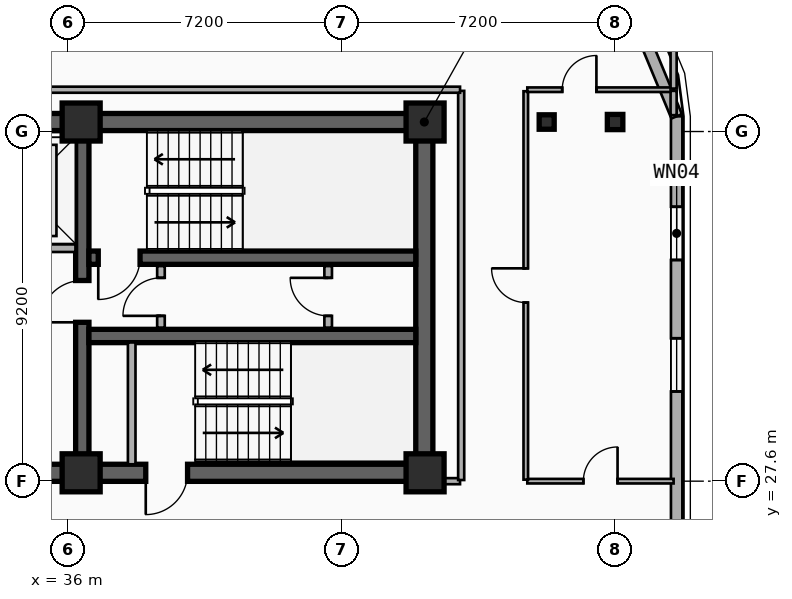
"""IFC4 building model, lengths in metres.
Left out: names, types, materials, properties, quantities, classifications, styles, units other than length and angle.
Written with IfcOpenShell. Run it as: python <this file> out.ifc"""

import sys

from ifc_helpers import new_model, si_unit, direction, frame, frame_2d, origin, origin_2d, place, context, subcontext, project, spatial, rectangle, i_section, extrude, element, fill, save


model = new_model("IFC4")
c1 = context("Model", 3, precision=1e-05, world=origin(), true_north=direction((0.0, 1.0)))
c2 = subcontext(c1, "Body", "Model", "MODEL_VIEW")
j1 = project(units=[si_unit("LENGTHUNIT", "METRE"), si_unit("PLANEANGLEUNIT", "RADIAN")], contexts=[c1])
p1 = place(None, origin())
s1 = spatial("IfcSite", under=j1, at=p1, CompositionType="ELEMENT")
p2 = place(p1, origin())
s2 = spatial("IfcBuilding", under=s1, at=p2, CompositionType="ELEMENT")
p3 = place(p2, frame((0.0, 0.0, 232.8)))
s3 = spatial("IfcBuildingStorey", under=s2, at=p3, CompositionType="ELEMENT", Elevation=232.8)
p4 = place(p3, frame((12.15, 37.05, 0.0), z_axis=(0.0, 0.0, 1.0), x_axis=(1.0, 0.0, 0.0)))
e1 = element("IfcWall", 1, at=p4, inside=s3, PredefinedType="SHEAR", context=c2, shape_type="SweptSolid", body=[
    extrude(rectangle(XDim=33.23, YDim=0.45, at=frame_2d((16.615, 0.0))), origin(), (0.0, 0.0, 1.0), 3.6),
])
p5 = place(p3, frame((45.38, 27.82, 0.0), z_axis=(0.0, 0.0, 1.0), x_axis=(-1.0, 0.0, 0.0)))
e2 = element("IfcWall", 2, at=p5, inside=s3, PredefinedType="SHEAR", context=c2, shape_type="SweptSolid", body=[
    extrude(rectangle(XDim=12.23, YDim=0.45, at=frame_2d((6.115, 0.0))), origin(), (0.0, 0.0, 1.0), 3.6),
])
p6 = place(p5, frame((9.93, 0.0, 0.0)))
e3 = element("IfcOpeningElement", 3, at=p6, cuts=e2, PredefinedType="OPENING", context=c2, shape_type="SweptSolid", body=[
    extrude(rectangle(XDim=1.1, YDim=2.15, at=frame_2d((0.55, 1.075))), frame((0.0, 0.235, 0.0), z_axis=(0.0, -1.0, 0.0), x_axis=(1.0, 0.0, 0.0)), (0.0, 0.0, 1.0), 0.47),
])
p7 = place(p5, frame((6.23, 0.0, 0.0)))
e4 = element("IfcOpeningElement", 4, at=p7, cuts=e2, PredefinedType="OPENING", context=c2, shape_type="SweptSolid", body=[
    extrude(rectangle(XDim=1.1, YDim=2.15, at=frame_2d((0.55, 1.075))), frame((0.0, 0.235, 0.0), z_axis=(0.0, -1.0, 0.0), x_axis=(1.0, 0.0, 0.0)), (0.0, 0.0, 1.0), 0.47),
])
p8 = place(p3, frame((45.38, 28.045, 0.0), z_axis=(0.0, 0.0, 1.0), x_axis=(0.0, 1.0, 0.0)))
e5 = element("IfcWall", 5, at=p8, inside=s3, PredefinedType="SHEAR", context=c2, shape_type="SweptSolid", body=[
    extrude(rectangle(XDim=8.78, YDim=0.45, at=frame_2d((4.39, 0.0))), origin(), (0.0, 0.0, 1.0), 3.6),
])
p9 = place(p3, frame((36.38, 28.045, 0.0), z_axis=(0.0, 0.0, 1.0), x_axis=(0.0, 1.0, 0.0)))
e6 = element("IfcWall", 6, at=p9, inside=s3, PredefinedType="SHEAR", context=c2, shape_type="SweptSolid", body=[
    extrude(rectangle(XDim=8.78, YDim=0.35, at=frame_2d((4.39, 0.0))), origin(), (0.0, 0.0, 1.0), 3.6),
])
p10 = place(p9, frame((3.735, 0.0, 0.0)))
e7 = element("IfcOpeningElement", 7, at=p10, cuts=e6, PredefinedType="OPENING", context=c2, shape_type="SweptSolid", body=[
    extrude(rectangle(XDim=1.1, YDim=2.15, at=frame_2d((0.55, 1.075))), frame((0.0, 0.185, 0.0), z_axis=(0.0, -1.0, 0.0), x_axis=(1.0, 0.0, 0.0)), (0.0, 0.0, 1.0), 0.37),
])
p11 = place(p3, frame((45.155, 33.48, 0.0), z_axis=(0.0, 0.0, 1.0), x_axis=(-1.0, 0.0, 0.0)))
e8 = element("IfcWall", 8, at=p11, inside=s3, PredefinedType="SHEAR", context=c2, shape_type="SweptSolid", body=[
    extrude(rectangle(XDim=8.6, YDim=0.35, at=frame_2d((4.3, 0.0))), origin(), (0.0, 0.0, 1.0), 3.6),
])
p12 = place(p11, frame((7.255, 0.0, 0.0)))
e9 = element("IfcOpeningElement", 9, at=p12, cuts=e8, PredefinedType="OPENING", context=c2, shape_type="SweptSolid", body=[
    extrude(rectangle(XDim=1.1, YDim=2.15, at=frame_2d((0.55, 1.075))), frame((0.0, 0.185, 0.0), z_axis=(0.0, -1.0, 0.0), x_axis=(1.0, 0.0, 0.0)), (0.0, 0.0, 1.0), 0.37),
])
p13 = place(p3, frame((36.555, 31.42, 0.0), z_axis=(0.0, 0.0, 1.0), x_axis=(1.0, 0.0, 0.0)))
e10 = element("IfcWall", 10, at=p13, inside=s3, PredefinedType="SHEAR", context=c2, shape_type="SweptSolid", body=[
    extrude(rectangle(XDim=8.6, YDim=0.35, at=frame_2d((4.3, 0.0))), origin(), (0.0, 0.0, 1.0), 3.6),
])
for number, where, z_axis, x_axis in (
    (11, (36.35, 27.82, 0.0), (0.0, 0.0, 1.0), (1.0, 0.0, 0.0)),
    (12, (36.35, 37.05, 0.0), (0.0, 0.0, 1.0), (1.0, 0.0, 0.0)),
    (13, (45.4, 27.82, 0.0), (0.0, 0.0, 1.0), (1.0, 0.0, 0.0)),
    (14, (45.4, 37.05, 0.0), (0.0, 0.0, 1.0), (1.0, 0.0, 0.0)),
):
    element("IfcColumn", number, at=place(p3, frame(where, z_axis=z_axis, x_axis=x_axis)), inside=s3, PredefinedType="COLUMN", context=c2, shape_type="SweptSolid", body=[
        extrude(rectangle(XDim=1.0, YDim=1.0, at=origin_2d()), origin(), (0.0, 0.0, 1.0), 3.6),
    ])
p14 = place(p3, frame((48.6, 37.05, 0.0), z_axis=(0.0, 0.0, 1.0), x_axis=(1.0, 0.0, 0.0)))
e15 = element("IfcColumn", 15, at=p14, inside=s3, PredefinedType="COLUMN", context=c2, shape_type="SweptSolid", body=[
    extrude(i_section(OverallWidth=0.395, OverallDepth=0.38, WebThickness=0.019, FlangeThickness=0.03, FilletRadius=0.015, at=origin_2d()), origin(), (0.0, 0.0, 1.0), 3.6),
])
p15 = place(p3, frame((50.4, 37.05, 0.0), z_axis=(0.0, 0.0, 1.0), x_axis=(1.0, 0.0, 0.0)))
e16 = element("IfcColumn", 16, at=p15, inside=s3, PredefinedType="COLUMN", context=c2, shape_type="SweptSolid", body=[
    extrude(i_section(OverallWidth=0.408, OverallDepth=0.4, WebThickness=0.025, FlangeThickness=0.039, FilletRadius=0.015, at=origin_2d()), origin(), (0.0, 0.0, 1.0), 3.6),
])
p16 = place(p3, frame((52.02, 37.2, 0.0), z_axis=(0.0, 0.0, 1.0), x_axis=(0.0, -1.0, 0.0)))
e17 = element("IfcWall", 17, at=p16, inside=s3, PredefinedType="SOLIDWALL", context=c2, shape_type="SweptSolid", body=[
    extrude(rectangle(XDim=28.6, YDim=0.3, at=frame_2d((14.3, 0.0))), origin(), (0.0, 0.0, 1.0), 3.34),
])
p17 = place(p16, frame((2.38, 0.0, 0.34)))
e18 = element("IfcOpeningElement", 18, at=p17, cuts=e17, PredefinedType="OPENING", context=c2, shape_type="SweptSolid", body=[
    extrude(rectangle(XDim=1.4, YDim=2.1, at=frame_2d((0.7, 1.05))), frame((0.0, 0.16, 0.0), z_axis=(0.0, -1.0, 0.0), x_axis=(1.0, 0.0, 0.0)), (0.0, 0.0, 1.0), 0.32),
])
p18 = place(p16, frame((5.84, 0.0, 0.34)))
e19 = element("IfcOpeningElement", 19, at=p18, cuts=e17, PredefinedType="OPENING", context=c2, shape_type="SweptSolid", body=[
    extrude(rectangle(XDim=1.4, YDim=2.1, at=frame_2d((0.7, 1.05))), frame((0.0, 0.16, 0.0), z_axis=(0.0, -1.0, 0.0), x_axis=(1.0, 0.0, 0.0)), (0.0, 0.0, 1.0), 0.32),
])
p19 = place(p16, frame((12.667, 0.0, 0.34)))
e20 = element("IfcOpeningElement", 20, at=p19, cuts=e17, PredefinedType="OPENING", context=c2, shape_type="SweptSolid", body=[
    extrude(rectangle(XDim=1.4, YDim=2.1, at=frame_2d((0.7, 1.05))), frame((0.0, 0.16, 0.0), z_axis=(0.0, -1.0, 0.0), x_axis=(1.0, 0.0, 0.0)), (0.0, 0.0, 1.0), 0.32),
])
p20 = place(p16, frame((14.683, 0.0, 0.34)))
e21 = element("IfcOpeningElement", 21, at=p20, cuts=e17, PredefinedType="OPENING", context=c2, shape_type="SweptSolid", body=[
    extrude(rectangle(XDim=1.4, YDim=2.1, at=frame_2d((0.7, 1.05))), frame((0.0, 0.16, 0.0), z_axis=(0.0, -1.0, 0.0), x_axis=(1.0, 0.0, 0.0)), (0.0, 0.0, 1.0), 0.32),
])
p21 = place(p3, frame((50.843, 40.042, 0.0), z_axis=(0.0, 0.0, 1.0), x_axis=(0.382704529509, -0.923870793506, 0.0)))
e22 = element("IfcWall", 22, at=p21, inside=s3, PredefinedType="SOLIDWALL", context=c2, shape_type="SweptSolid", body=[
    extrude(rectangle(XDim=3.077, YDim=0.3, at=frame_2d((1.538, 0.0))), origin(), (0.0, 0.0, 1.0), 3.34),
])
p22 = place(p3, frame((33.475, 33.73, 0.0), z_axis=(0.0, 0.0, 1.0), x_axis=(1.0, 0.0, 0.0)))
e23 = element("IfcWall", 23, at=p22, inside=s3, PredefinedType="PARTITIONING", context=c2, shape_type="SweptSolid", body=[
    extrude(rectangle(XDim=2.725, YDim=0.2, at=frame_2d((1.362, 0.0))), origin(), (0.0, 0.0, 1.0), 2.41),
])
p23 = place(p22, frame((0.812, 0.0, 0.0)))
e24 = element("IfcOpeningElement", 24, at=p23, cuts=e23, PredefinedType="OPENING", context=c2, shape_type="SweptSolid", body=[
    extrude(rectangle(XDim=1.1, YDim=2.15, at=frame_2d((0.55, 1.075))), frame((0.0, 0.11, 0.0), z_axis=(0.0, -1.0, 0.0), x_axis=(1.0, 0.0, 0.0)), (0.0, 0.0, 1.0), 0.22),
])
p24 = place(p3, frame((37.68, 28.045, 0.0), z_axis=(0.0, 0.0, 1.0), x_axis=(0.0, 1.0, 0.0)))
e25 = element("IfcWall", 25, at=p24, inside=s3, PredefinedType="PARTITIONING", context=c2, shape_type="SweptSolid", body=[
    extrude(rectangle(XDim=3.205, YDim=0.2, at=frame_2d((1.603, 0.0))), origin(), (0.0, 0.0, 1.0), 2.72),
])
p25 = place(p3, frame((38.45, 31.64, 0.0), z_axis=(0.0, 0.0, 1.0), x_axis=(0.0, 1.0, 0.0)))
e26 = element("IfcWall", 26, at=p25, inside=s3, PredefinedType="PARTITIONING", context=c2, shape_type="SweptSolid", body=[
    extrude(rectangle(XDim=1.62, YDim=0.2, at=frame_2d((0.81, 0.0))), origin(), (0.0, 0.0, 1.0), 3.34),
])
p26 = place(p25, frame((0.31, 0.0, 0.0)))
e27 = element("IfcOpeningElement", 27, at=p26, cuts=e26, PredefinedType="OPENING", context=c2, shape_type="SweptSolid", body=[
    extrude(rectangle(XDim=1.0, YDim=2.15, at=frame_2d((0.5, 1.075))), frame((0.0, 0.11, 0.0), z_axis=(0.0, -1.0, 0.0), x_axis=(1.0, 0.0, 0.0)), (0.0, 0.0, 1.0), 0.22),
])
p27 = place(p3, frame((42.85, 31.64, 0.0), z_axis=(0.0, 0.0, 1.0), x_axis=(0.0, 1.0, 0.0)))
e28 = element("IfcWall", 28, at=p27, inside=s3, PredefinedType="PARTITIONING", context=c2, shape_type="SweptSolid", body=[
    extrude(rectangle(XDim=1.62, YDim=0.2, at=frame_2d((0.81, 0.0))), origin(), (0.0, 0.0, 1.0), 3.34),
])
p28 = place(p27, frame((0.31, 0.0, 0.0)))
e29 = element("IfcOpeningElement", 29, at=p28, cuts=e28, PredefinedType="OPENING", context=c2, shape_type="SweptSolid", body=[
    extrude(rectangle(XDim=1.0, YDim=2.15, at=frame_2d((0.5, 1.075))), frame((0.0, 0.11, 0.0), z_axis=(0.0, -1.0, 0.0), x_axis=(1.0, 0.0, 0.0)), (0.0, 0.0, 1.0), 0.22),
])
p29 = place(p3, frame((48.09, 27.6, 0.0), z_axis=(0.0, 0.0, 1.0), x_axis=(1.0, 0.0, 0.0)))
e30 = element("IfcWall", 30, at=p29, inside=s3, PredefinedType="PARTITIONING", context=c2, shape_type="SweptSolid", body=[
    extrude(rectangle(XDim=3.85, YDim=0.12, at=frame_2d((1.925, 0.0))), origin(), (0.0, 0.0, 1.0), 2.67),
])
p30 = place(p29, frame((1.475, 0.0, 0.0)))
e31 = element("IfcOpeningElement", 31, at=p30, cuts=e30, PredefinedType="OPENING", context=c2, shape_type="SweptSolid", body=[
    extrude(rectangle(XDim=0.9, YDim=2.1, at=frame_2d((0.45, 1.05))), frame((0.0, 0.07, 0.0), z_axis=(0.0, -1.0, 0.0), x_axis=(1.0, 0.0, 0.0)), (0.0, 0.0, 1.0), 0.14),
])
p31 = place(p3, frame((48.05, 27.64, 0.0), z_axis=(0.0, 0.0, 1.0), x_axis=(0.0, 1.0, 0.0)))
e32 = element("IfcWall", 32, at=p31, inside=s3, PredefinedType="PARTITIONING", context=c2, shape_type="SweptSolid", body=[
    extrude(rectangle(XDim=10.22, YDim=0.12, at=frame_2d((5.11, 0.0))), origin(), (0.0, 0.0, 1.0), 2.82),
])
p32 = place(p31, frame((4.66, 0.0, 0.0)))
e33 = element("IfcOpeningElement", 33, at=p32, cuts=e32, PredefinedType="OPENING", context=c2, shape_type="SweptSolid", body=[
    extrude(rectangle(XDim=0.9, YDim=2.1, at=frame_2d((0.45, 1.05))), frame((0.0, 0.07, 0.0), z_axis=(0.0, -1.0, 0.0), x_axis=(1.0, 0.0, 0.0)), (0.0, 0.0, 1.0), 0.14),
])
p33 = place(p3, frame((48.09, 37.9, 0.0), z_axis=(0.0, 0.0, 1.0), x_axis=(1.0, 0.0, 0.0)))
e34 = element("IfcWall", 34, at=p33, inside=s3, PredefinedType="PARTITIONING", context=c2, shape_type="SweptSolid", body=[
    extrude(rectangle(XDim=3.85, YDim=0.12, at=frame_2d((1.925, 0.0))), origin(), (0.0, 0.0, 1.0), 3.34),
])
p34 = place(p33, frame((0.919, 0.0, 0.0)))
e35 = element("IfcOpeningElement", 35, at=p34, cuts=e34, PredefinedType="OPENING", context=c2, shape_type="SweptSolid", body=[
    extrude(rectangle(XDim=0.9, YDim=2.1, at=frame_2d((0.45, 1.05))), frame((0.0, 0.07, 0.0), z_axis=(0.0, -1.0, 0.0), x_axis=(1.0, 0.0, 0.0)), (0.0, 0.0, 1.0), 0.14),
])
p35 = place(p3, frame((45.41, 27.6, 0.0), z_axis=(0.0, 0.0, 1.0), x_axis=(1.0, 0.0, 0.0)))
e36 = element("IfcWall", 36, at=p35, inside=s3, PredefinedType="PARTITIONING", context=c2, shape_type="SweptSolid", body=[
    extrude(rectangle(XDim=0.91, YDim=0.16, at=frame_2d((0.455, 0.0))), origin(), (0.0, 0.0, 1.0), 2.41),
])
p36 = place(p3, frame((46.35, 27.63, 0.0), z_axis=(0.0, 0.0, 1.0), x_axis=(0.0, 1.0, 0.0)))
e37 = element("IfcWall", 37, at=p36, inside=s3, PredefinedType="PARTITIONING", context=c2, shape_type="SweptSolid", body=[
    extrude(rectangle(XDim=10.24, YDim=0.16, at=frame_2d((5.12, 0.0))), origin(), (0.0, 0.0, 1.0), 2.82),
])
p37 = place(p3, frame((11.28, 37.9, 0.0), z_axis=(0.0, 0.0, 1.0), x_axis=(1.0, 0.0, 0.0)))
e38 = element("IfcWall", 38, at=p37, inside=s3, PredefinedType="PARTITIONING", context=c2, shape_type="SweptSolid", body=[
    extrude(rectangle(XDim=35.04, YDim=0.16, at=frame_2d((17.52, 0.0))), origin(), (0.0, 0.0, 1.0), 3.34),
])
p38 = place(p3, frame((51.94, 37.93, 0.0), z_axis=(0.0, 0.0, 1.0), x_axis=(0.0, 1.0, 0.0)))
e39 = element("IfcWall", 39, at=p38, inside=s3, PredefinedType="PARTITIONING", context=c2, shape_type="SweptSolid", body=[
    extrude(rectangle(XDim=1.44, YDim=0.16, at=frame_2d((0.72, 0.0))), origin(), (0.0, 0.0, 1.0), 3.34),
])
p39 = place(p3, frame((51.94, 37.23, 0.0), z_axis=(0.0, 0.0, 1.0), x_axis=(0.0, 1.0, 0.0)))
e40 = element("IfcWall", 40, at=p39, inside=s3, PredefinedType="PARTITIONING", context=c2, shape_type="SweptSolid", body=[
    extrude(rectangle(XDim=0.64, YDim=0.16, at=frame_2d((0.32, 0.0))), origin(), (0.0, 0.0, 1.0), 3.34),
])
p40 = place(p17, origin())
e41 = element("IfcWindow", 41, at=p40, inside=s3, PartitioningType="SINGLE_PANEL", PredefinedType="WINDOW", context=c2, shape_type="SweptSolid", body=[
    extrude(rectangle(XDim=1.4, YDim=2.1, at=frame_2d((0.7, 1.05))), frame((0.0, 0.03, 0.0), z_axis=(0.0, -1.0, 0.0), x_axis=(1.0, 0.0, 0.0)), (0.0, 0.0, 1.0), 0.06),
])
fill(e18, e41)
p41 = place(p18, origin())
e42 = element("IfcWindow", 42, at=p41, inside=s3, PartitioningType="SINGLE_PANEL", PredefinedType="WINDOW", context=c2, shape_type="SweptSolid", body=[
    extrude(rectangle(XDim=1.4, YDim=2.1, at=frame_2d((0.7, 1.05))), frame((0.0, 0.03, 0.0), z_axis=(0.0, -1.0, 0.0), x_axis=(1.0, 0.0, 0.0)), (0.0, 0.0, 1.0), 0.06),
])
fill(e19, e42)
p42 = place(p12, origin())
e43 = element("IfcDoor", 43, at=p42, inside=s3, OperationType="SINGLE_SWING_RIGHT", PredefinedType="DOOR", context=c2, shape_type="SweptSolid", body=[
    extrude(rectangle(XDim=1.1, YDim=2.15, at=frame_2d((0.55, 1.075))), frame((0.0, 0.025, 0.0), z_axis=(0.0, -1.0, 0.0), x_axis=(1.0, 0.0, 0.0)), (0.0, 0.0, 1.0), 0.05),
])
fill(e9, e43)
p43 = place(p10, origin())
e44 = element("IfcDoor", 44, at=p43, inside=s3, OperationType="SINGLE_SWING_LEFT", PredefinedType="DOOR", context=c2, shape_type="SweptSolid", body=[
    extrude(rectangle(XDim=1.1, YDim=2.15, at=frame_2d((0.55, 1.075))), frame((0.0, 0.025, 0.0), z_axis=(0.0, -1.0, 0.0), x_axis=(1.0, 0.0, 0.0)), (0.0, 0.0, 1.0), 0.05),
])
fill(e7, e44)
p44 = place(p7, origin())
e45 = element("IfcDoor", 45, at=p44, inside=s3, OperationType="SINGLE_SWING_RIGHT", PredefinedType="DOOR", context=c2, shape_type="SweptSolid", body=[
    extrude(rectangle(XDim=1.1, YDim=2.15, at=frame_2d((0.55, 1.075))), frame((0.0, 0.025, 0.0), z_axis=(0.0, -1.0, 0.0), x_axis=(1.0, 0.0, 0.0)), (0.0, 0.0, 1.0), 0.05),
])
fill(e4, e45)
p45 = place(p26, origin())
e46 = element("IfcDoor", 46, at=p45, inside=s3, OperationType="SINGLE_SWING_LEFT", PredefinedType="DOOR", context=c2, shape_type="SweptSolid", body=[
    extrude(rectangle(XDim=1.0, YDim=2.15, at=frame_2d((0.5, 1.075))), frame((0.0, 0.025, 0.0), z_axis=(0.0, -1.0, 0.0), x_axis=(1.0, 0.0, 0.0)), (0.0, 0.0, 1.0), 0.05),
])
fill(e27, e46)
p46 = place(p28, origin())
e47 = element("IfcDoor", 47, at=p46, inside=s3, OperationType="SINGLE_SWING_RIGHT", PredefinedType="DOOR", context=c2, shape_type="SweptSolid", body=[
    extrude(rectangle(XDim=1.0, YDim=2.15, at=frame_2d((0.5, 1.075))), frame((0.0, 0.025, 0.0), z_axis=(0.0, -1.0, 0.0), x_axis=(1.0, 0.0, 0.0)), (0.0, 0.0, 1.0), 0.05),
])
fill(e29, e47)
p47 = place(p30, origin())
e48 = element("IfcDoor", 48, at=p47, inside=s3, OperationType="SINGLE_SWING_RIGHT", PredefinedType="DOOR", context=c2, shape_type="SweptSolid", body=[
    extrude(rectangle(XDim=0.9, YDim=2.1, at=frame_2d((0.45, 1.05))), frame((0.0, 0.025, 0.0), z_axis=(0.0, -1.0, 0.0), x_axis=(1.0, 0.0, 0.0)), (0.0, 0.0, 1.0), 0.05),
])
fill(e31, e48)
p48 = place(p32, origin())
e49 = element("IfcDoor", 49, at=p48, inside=s3, OperationType="SINGLE_SWING_RIGHT", PredefinedType="DOOR", context=c2, shape_type="SweptSolid", body=[
    extrude(rectangle(XDim=0.9, YDim=2.1, at=frame_2d((0.45, 1.05))), frame((0.0, 0.025, 0.0), z_axis=(0.0, -1.0, 0.0), x_axis=(1.0, 0.0, 0.0)), (0.0, 0.0, 1.0), 0.05),
])
fill(e33, e49)
p49 = place(p34, origin())
e50 = element("IfcDoor", 50, at=p49, inside=s3, OperationType="SINGLE_SWING_RIGHT", PredefinedType="DOOR", context=c2, shape_type="SweptSolid", body=[
    extrude(rectangle(XDim=0.9, YDim=2.1, at=frame_2d((0.45, 1.05))), frame((0.0, 0.025, 0.0), z_axis=(0.0, -1.0, 0.0), x_axis=(1.0, 0.0, 0.0)), (0.0, 0.0, 1.0), 0.05),
])
fill(e35, e50)
save(model, sys.argv[1])
